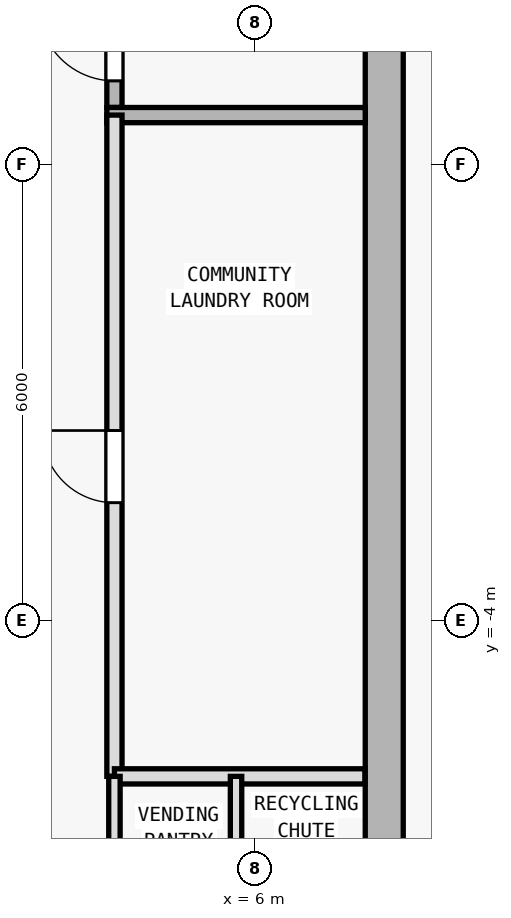
"""IFC4 building model, lengths in metres.
Left out: names, types, materials, properties, quantities, classifications, styles, units other than length and angle.
Written with IfcOpenShell. Run it as: python <this file> out.ifc"""

import sys

from ifc_helpers import new_model, si_unit, direction, frame, frame_2d, origin, origin_2d, place, context, subcontext, project, spatial, rectangle, i_section, extrude, element, fill, save


model = new_model("IFC4")
c1 = context("Model", 3, precision=1e-05, world=origin(), true_north=direction((0.0, 1.0)))
c2 = subcontext(c1, "Body", "Model", "MODEL_VIEW")
j1 = project(units=[si_unit("LENGTHUNIT", "METRE"), si_unit("PLANEANGLEUNIT", "RADIAN")], contexts=[c1])
p1 = place(None, origin())
s1 = spatial("IfcSite", under=j1, at=p1, CompositionType="ELEMENT")
p2 = place(p1, origin())
s2 = spatial("IfcBuilding", under=s1, at=p2, CompositionType="ELEMENT")
p3 = place(p2, frame((0.0, 0.0, 283.2)))
s3 = spatial("IfcBuildingStorey", under=s2, at=p3, CompositionType="ELEMENT", Elevation=283.2)
p4 = place(p3, frame((7.7, 0.4, 0.0), z_axis=(0.0, 0.0, 1.0), x_axis=(1.0, 0.0, 0.0)))
e1 = element("IfcColumn", 1, at=p4, inside=s3, PredefinedType="COLUMN", context=c2, shape_type="SweptSolid", body=[
    extrude(i_section(OverallWidth=0.374, OverallDepth=0.372, WebThickness=0.012, FlangeThickness=0.02, FilletRadius=0.015, at=origin_2d()), origin(), (0.0, 0.0, 1.0), 3.6),
])
p5 = place(p3, frame((7.7, 9.95, 0.0), z_axis=(0.0, 0.0, 1.0), x_axis=(0.0, -1.0, 0.0)))
e2 = element("IfcWall", 2, at=p5, inside=s3, PredefinedType="SHEAR", context=c2, shape_type="SweptSolid", body=[
    extrude(rectangle(XDim=19.1, YDim=0.5, at=frame_2d((9.55, 0.0))), origin(), (0.0, 0.0, 1.0), 3.35),
])
p6 = place(p3, frame((4.15, 2.75, 0.0), z_axis=(0.0, 0.0, 1.0), x_axis=(0.0, 1.0, 0.0)))
e3 = element("IfcWall", 3, at=p6, inside=s3, PredefinedType="SOLIDWALL", context=c2, shape_type="SweptSolid", body=[
    extrude(rectangle(XDim=7.2, YDim=0.2, at=frame_2d((3.6, 0.0))), origin(), (0.0, 0.0, 1.0), 3.35),
])
p7 = place(p6, frame((0.35, 0.0, 0.0)))
e4 = element("IfcOpeningElement", 4, at=p7, cuts=e3, PredefinedType="OPENING", context=c2, shape_type="SweptSolid", body=[
    extrude(rectangle(XDim=1.0, YDim=2.15, at=frame_2d((0.5, 1.075))), frame((0.0, 0.11, 0.0), z_axis=(0.0, -1.0, 0.0), x_axis=(1.0, 0.0, 0.0)), (0.0, 0.0, 1.0), 0.22),
])
p8 = place(p3, frame((4.05, 2.65, 0.0), z_axis=(0.0, 0.0, 1.0), x_axis=(1.0, 0.0, 0.0)))
e5 = element("IfcWall", 5, at=p8, inside=s3, PredefinedType="SOLIDWALL", context=c2, shape_type="SweptSolid", body=[
    extrude(rectangle(XDim=3.4, YDim=0.2, at=frame_2d((1.7, 0.0))), origin(), (0.0, 0.0, 1.0), 3.35),
])
p9 = place(p3, frame((4.15, -6.05, 0.0), z_axis=(0.0, 0.0, 1.0), x_axis=(0.0, 1.0, 0.0)))
e6 = element("IfcWall", 6, at=p9, inside=s3, PredefinedType="SOLIDWALL", context=c2, shape_type="SweptSolid", body=[
    extrude(rectangle(XDim=8.7, YDim=0.2, at=frame_2d((4.35, 0.0))), origin(), (0.0, 0.0, 1.0), 3.35),
])
p10 = place(p9, frame((3.6, 0.0, 0.0)))
e7 = element("IfcOpeningElement", 7, at=p10, cuts=e6, PredefinedType="OPENING", context=c2, shape_type="SweptSolid", body=[
    extrude(rectangle(XDim=0.95, YDim=2.1, at=frame_2d((0.475, 1.05))), frame((0.0, 0.11, 0.0), z_axis=(0.0, -1.0, 0.0), x_axis=(1.0, 0.0, 0.0)), (0.0, 0.0, 1.0), 0.22),
])
p11 = place(p3, frame((4.15, -6.05, 0.0), z_axis=(0.0, 0.0, 1.0), x_axis=(1.0, 0.0, 0.0)))
e8 = element("IfcWall", 8, at=p11, inside=s3, PredefinedType="SOLIDWALL", context=c2, shape_type="SweptSolid", body=[
    extrude(rectangle(XDim=3.295, YDim=0.2, at=frame_2d((1.647, 0.0))), origin(), (0.0, 0.0, 1.0), 3.35),
])
p12 = place(p3, frame((4.15, -9.145, 0.0), z_axis=(0.0, 0.0, 1.0), x_axis=(0.0, 1.0, 0.0)))
e9 = element("IfcWall", 9, at=p12, inside=s3, PredefinedType="PARTITIONING", context=c2, shape_type="SweptSolid", body=[
    extrude(rectangle(XDim=3.095, YDim=0.15, at=frame_2d((1.547, 0.0))), origin(), (0.0, 0.0, 1.0), 3.35),
])
p13 = place(p12, frame((0.845, 0.0, 0.0)))
e10 = element("IfcOpeningElement", 10, at=p13, cuts=e9, PredefinedType="OPENING", context=c2, shape_type="SweptSolid", body=[
    extrude(rectangle(XDim=0.9, YDim=2.1, at=frame_2d((0.45, 1.05))), frame((0.0, 0.085, 0.0), z_axis=(0.0, -1.0, 0.0), x_axis=(1.0, 0.0, 0.0)), (0.0, 0.0, 1.0), 0.17),
])
p14 = place(p3, frame((5.75, -9.145, 0.0), z_axis=(0.0, 0.0, 1.0), x_axis=(0.0, 1.0, 0.0)))
e11 = element("IfcWall", 11, at=p14, inside=s3, PredefinedType="PARTITIONING", context=c2, shape_type="SweptSolid", body=[
    extrude(rectangle(XDim=3.095, YDim=0.15, at=frame_2d((1.547, 0.0))), origin(), (0.0, 0.0, 1.0), 3.35),
])
p15 = place(p14, frame((0.845, 0.0, 0.0)))
e12 = element("IfcOpeningElement", 12, at=p15, cuts=e11, PredefinedType="OPENING", context=c2, shape_type="SweptSolid", body=[
    extrude(rectangle(XDim=0.9, YDim=2.1, at=frame_2d((0.45, 1.05))), frame((0.0, 0.085, 0.0), z_axis=(0.0, -1.0, 0.0), x_axis=(1.0, 0.0, 0.0)), (0.0, 0.0, 1.0), 0.17),
])
p16 = place(p7, origin())
e13 = element("IfcDoor", 13, at=p16, inside=s3, OperationType="SINGLE_SWING_RIGHT", PredefinedType="DOOR", context=c2, shape_type="SweptSolid", body=[
    extrude(rectangle(XDim=1.0, YDim=2.15, at=frame_2d((0.5, 1.075))), frame((0.0, 0.025, 0.0), z_axis=(0.0, -1.0, 0.0), x_axis=(1.0, 0.0, 0.0)), (0.0, 0.0, 1.0), 0.05),
])
fill(e4, e13)
p17 = place(p10, origin())
e14 = element("IfcDoor", 14, at=p17, inside=s3, OperationType="SINGLE_SWING_RIGHT", PredefinedType="DOOR", context=c2, shape_type="SweptSolid", body=[
    extrude(rectangle(XDim=0.95, YDim=2.1, at=frame_2d((0.475, 1.05))), frame((0.0, 0.025, 0.0), z_axis=(0.0, -1.0, 0.0), x_axis=(1.0, 0.0, 0.0)), (0.0, 0.0, 1.0), 0.05),
])
fill(e7, e14)
save(model, sys.argv[1])
